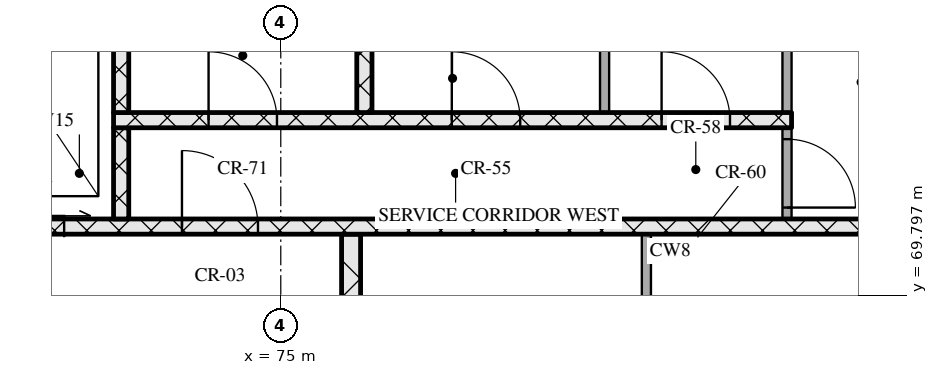
"""IFC4 building model, lengths in metres.
Left out: names, types, materials, properties, quantities, classifications, styles, units other than length and angle.
Written with IfcOpenShell. Run it as: python <this file> out.ifc"""

import sys

from ifc_helpers import new_model, si_unit, direction, frame, frame_2d, origin, place, context, subcontext, project, spatial, rectangle, extrude, element, fill, save


model = new_model("IFC4")
c1 = context("Model", 3, precision=1e-05, world=origin(), true_north=direction((0.0, 1.0)))
c2 = subcontext(c1, "Body", "Model", "MODEL_VIEW")
j1 = project(units=[si_unit("LENGTHUNIT", "METRE"), si_unit("PLANEANGLEUNIT", "RADIAN")], contexts=[c1])
p1 = place(None, origin())
s1 = spatial("IfcSite", under=j1, at=p1, CompositionType="ELEMENT")
p2 = place(p1, origin())
s2 = spatial("IfcBuilding", under=s1, at=p2, CompositionType="ELEMENT")
p3 = place(p2, frame((0.0, 0.0, 212.7)))
s3 = spatial("IfcBuildingStorey", under=s2, at=p3, CompositionType="ELEMENT", Elevation=212.7)
p4 = place(p3, frame((79.81, 68.0, 0.0), z_axis=(0.0, 0.0, 1.0), x_axis=(0.0, 1.0, 0.0)))
e1 = element("IfcWall", 1, at=p4, inside=s3, PredefinedType="PARTITIONING", context=c2, shape_type="SweptSolid", body=[
    extrude(rectangle(XDim=2.6, YDim=0.12, at=frame_2d((1.3, 0.0))), origin(), (0.0, 0.0, 1.0), 3.32),
])
p5 = place(p3, frame((75.925, 68.3, 0.0), z_axis=(0.0, 0.0, 1.0), x_axis=(0.0, 1.0, 0.0)))
e2 = element("IfcWall", 2, at=p5, inside=s3, PredefinedType="SOLIDWALL", context=c2, shape_type="SweptSolid", body=[
    extrude(rectangle(XDim=2.3, YDim=0.25, at=frame_2d((1.15, 0.0))), origin(), (0.0, 0.0, 1.0), 3.32),
])
p6 = place(p3, frame((67.8, 70.7, 0.0), z_axis=(0.0, 0.0, 1.0), x_axis=(1.0, 0.0, 0.0)))
e3 = element("IfcWall", 3, at=p6, inside=s3, PredefinedType="SOLIDWALL", context=c2, shape_type="SweptSolid", body=[
    extrude(rectangle(XDim=39.6, YDim=0.2, at=frame_2d((19.8, 0.0))), origin(), (0.0, 0.0, 1.0), 3.32),
])
p7 = place(p6, frame((0.65, 0.0, 0.0)))
e4 = element("IfcOpeningElement", 4, at=p7, cuts=e3, PredefinedType="OPENING", context=c2, shape_type="SweptSolid", body=[
    extrude(rectangle(XDim=1.1, YDim=2.1, at=frame_2d((0.55, 1.05))), frame((0.0, 0.11, 0.0), z_axis=(0.0, -1.0, 0.0), x_axis=(1.0, 0.0, 0.0)), (0.0, 0.0, 1.0), 0.22),
])
p8 = place(p6, frame((3.25, 0.0, 0.0)))
e5 = element("IfcOpeningElement", 5, at=p8, cuts=e3, PredefinedType="OPENING", context=c2, shape_type="SweptSolid", body=[
    extrude(rectangle(XDim=1.1, YDim=2.1, at=frame_2d((0.55, 1.05))), frame((0.0, 0.11, 0.0), z_axis=(0.0, -1.0, 0.0), x_axis=(1.0, 0.0, 0.0)), (0.0, 0.0, 1.0), 0.22),
])
p9 = place(p6, frame((5.9, 0.0, 0.0)))
e6 = element("IfcOpeningElement", 6, at=p9, cuts=e3, PredefinedType="OPENING", context=c2, shape_type="SweptSolid", body=[
    extrude(rectangle(XDim=1.0, YDim=2.1, at=frame_2d((0.5, 1.05))), frame((0.0, 0.11, 0.0), z_axis=(0.0, -1.0, 0.0), x_axis=(1.0, 0.0, 0.0)), (0.0, 0.0, 1.0), 0.22),
])
p10 = place(p6, frame((21.7, 0.0, 0.0)))
e7 = element("IfcOpeningElement", 7, at=p10, cuts=e3, PredefinedType="OPENING", context=c2, shape_type="SweptSolid", body=[
    extrude(rectangle(XDim=1.0, YDim=2.1, at=frame_2d((0.5, 1.05))), frame((0.0, 0.11, 0.0), z_axis=(0.0, -1.0, 0.0), x_axis=(1.0, 0.0, 0.0)), (0.0, 0.0, 1.0), 0.22),
])
p11 = place(p6, frame((32.7, 0.0, 0.0)))
e8 = element("IfcOpeningElement", 8, at=p11, cuts=e3, PredefinedType="OPENING", context=c2, shape_type="SweptSolid", body=[
    extrude(rectangle(XDim=1.0, YDim=2.1, at=frame_2d((0.5, 1.05))), frame((0.0, 0.11, 0.0), z_axis=(0.0, -1.0, 0.0), x_axis=(1.0, 0.0, 0.0)), (0.0, 0.0, 1.0), 0.22),
])
p12 = place(p6, frame((35.25, 0.0, 0.0)))
e9 = element("IfcOpeningElement", 9, at=p12, cuts=e3, PredefinedType="OPENING", context=c2, shape_type="SweptSolid", body=[
    extrude(rectangle(XDim=1.1, YDim=2.1, at=frame_2d((0.55, 1.05))), frame((0.0, 0.11, 0.0), z_axis=(0.0, -1.0, 0.0), x_axis=(1.0, 0.0, 0.0)), (0.0, 0.0, 1.0), 0.22),
])
p13 = place(p6, frame((37.85, 0.0, 0.0)))
e10 = element("IfcOpeningElement", 10, at=p13, cuts=e3, PredefinedType="OPENING", context=c2, shape_type="SweptSolid", body=[
    extrude(rectangle(XDim=1.1, YDim=2.1, at=frame_2d((0.55, 1.05))), frame((0.0, 0.11, 0.0), z_axis=(0.0, -1.0, 0.0), x_axis=(1.0, 0.0, 0.0)), (0.0, 0.0, 1.0), 0.22),
])
p14 = place(p3, frame((72.9, 70.8, 0.0), z_axis=(0.0, 0.0, 1.0), x_axis=(0.0, 1.0, 0.0)))
e11 = element("IfcWall", 11, at=p14, inside=s3, PredefinedType="SOLIDWALL", context=c2, shape_type="SweptSolid", body=[
    extrude(rectangle(XDim=1.2, YDim=0.2, at=frame_2d((0.6, 0.0))), origin(), (0.0, 0.0, 1.0), 3.32),
])
p15 = place(p3, frame((81.66, 70.8, 0.0), z_axis=(0.0, 0.0, 1.0), x_axis=(0.0, 1.0, 0.0)))
e12 = element("IfcWall", 12, at=p15, inside=s3, PredefinedType="PARTITIONING", context=c2, shape_type="SweptSolid", body=[
    extrude(rectangle(XDim=1.2, YDim=0.12, at=frame_2d((0.6, 0.0))), origin(), (0.0, 0.0, 1.0), 3.32),
])
p16 = place(p15, frame((0.15, 0.0, 0.0)))
e13 = element("IfcOpeningElement", 13, at=p16, cuts=e12, PredefinedType="OPENING", context=c2, shape_type="SweptSolid", body=[
    extrude(rectangle(XDim=0.9, YDim=2.1, at=frame_2d((0.45, 1.05))), frame((0.0, 0.07, 0.0), z_axis=(0.0, -1.0, 0.0), x_axis=(1.0, 0.0, 0.0)), (0.0, 0.0, 1.0), 0.14),
])
p17 = place(p3, frame((72.8, 72.1, 0.0), z_axis=(0.0, 0.0, 1.0), x_axis=(1.0, 0.0, 0.0)))
e14 = element("IfcWall", 14, at=p17, inside=s3, PredefinedType="SOLIDWALL", context=c2, shape_type="SweptSolid", body=[
    extrude(rectangle(XDim=8.92, YDim=0.2, at=frame_2d((4.46, 0.0))), origin(), (0.0, 0.0, 1.0), 3.32),
])
p18 = place(p17, frame((1.25, 0.0, 0.0)))
e15 = element("IfcOpeningElement", 15, at=p18, cuts=e14, PredefinedType="OPENING", context=c2, shape_type="SweptSolid", body=[
    extrude(rectangle(XDim=0.9, YDim=2.1, at=frame_2d((0.45, 1.05))), frame((0.0, 0.11, 0.0), z_axis=(0.0, -1.0, 0.0), x_axis=(1.0, 0.0, 0.0)), (0.0, 0.0, 1.0), 0.22),
])
p19 = place(p17, frame((4.45, 0.0, 0.0)))
e16 = element("IfcOpeningElement", 16, at=p19, cuts=e14, PredefinedType="OPENING", context=c2, shape_type="SweptSolid", body=[
    extrude(rectangle(XDim=0.9, YDim=2.1, at=frame_2d((0.45, 1.05))), frame((0.0, 0.11, 0.0), z_axis=(0.0, -1.0, 0.0), x_axis=(1.0, 0.0, 0.0)), (0.0, 0.0, 1.0), 0.22),
])
p20 = place(p17, frame((7.21, 0.0, 0.0)))
e17 = element("IfcOpeningElement", 17, at=p20, cuts=e14, PredefinedType="OPENING", context=c2, shape_type="SweptSolid", body=[
    extrude(rectangle(XDim=0.9, YDim=2.1, at=frame_2d((0.45, 1.05))), frame((0.0, 0.11, 0.0), z_axis=(0.0, -1.0, 0.0), x_axis=(1.0, 0.0, 0.0)), (0.0, 0.0, 1.0), 0.22),
])
for number, where, z_axis, x_axis in (
    (18, (72.9, 72.2, 0.0), (0.0, 0.0, 1.0), (0.0, 1.0, 0.0)),
    (19, (76.1, 72.2, 0.0), (0.0, 0.0, 1.0), (0.0, 1.0, 0.0)),
):
    element("IfcWall", number, at=place(p3, frame(where, z_axis=z_axis, x_axis=x_axis)), inside=s3, PredefinedType="SOLIDWALL", context=c2, shape_type="SweptSolid", body=[
        extrude(rectangle(XDim=2.2, YDim=0.2, at=frame_2d((1.1, 0.0))), origin(), (0.0, 0.0, 1.0), 3.32),
    ])
for number, where, z_axis, x_axis in (
    (20, (79.26, 72.2, 0.0), (0.0, 0.0, 1.0), (0.0, 1.0, 0.0)),
    (21, (81.66, 72.2, 0.0), (0.0, 0.0, 1.0), (0.0, 1.0, 0.0)),
):
    element("IfcWall", number, at=place(p3, frame(where, z_axis=z_axis, x_axis=x_axis)), inside=s3, PredefinedType="PARTITIONING", context=c2, shape_type="SweptSolid", body=[
        extrude(rectangle(XDim=2.2, YDim=0.12, at=frame_2d((1.1, 0.0))), origin(), (0.0, 0.0, 1.0), 3.32),
    ])
p21 = place(p8, origin())
e22 = element("IfcDoor", 22, at=p21, inside=s3, OperationType="SLIDING_TO_RIGHT", PredefinedType="DOOR", context=c2, shape_type="SweptSolid", body=[
    extrude(rectangle(XDim=1.1, YDim=2.1, at=frame_2d((0.55, 1.05))), frame((0.0, 0.025, 0.0), z_axis=(0.0, -1.0, 0.0), x_axis=(1.0, 0.0, 0.0)), (0.0, 0.0, 1.0), 0.05),
])
fill(e5, e22)
p22 = place(p9, origin())
e23 = element("IfcDoor", 23, at=p22, inside=s3, OperationType="SINGLE_SWING_LEFT", PredefinedType="DOOR", context=c2, shape_type="SweptSolid", body=[
    extrude(rectangle(XDim=1.0, YDim=2.1, at=frame_2d((0.5, 1.05))), frame((0.0, 0.025, 0.0), z_axis=(0.0, -1.0, 0.0), x_axis=(1.0, 0.0, 0.0)), (0.0, 0.0, 1.0), 0.05),
])
fill(e6, e23)
p23 = place(p16, origin())
e24 = element("IfcDoor", 24, at=p23, inside=s3, OperationType="SINGLE_SWING_RIGHT", PredefinedType="DOOR", context=c2, shape_type="SweptSolid", body=[
    extrude(rectangle(XDim=0.9, YDim=2.1, at=frame_2d((0.45, 1.05))), frame((0.0, 0.025, 0.0), z_axis=(0.0, -1.0, 0.0), x_axis=(1.0, 0.0, 0.0)), (0.0, 0.0, 1.0), 0.05),
])
fill(e13, e24)
p24 = place(p18, origin())
e25 = element("IfcDoor", 25, at=p24, inside=s3, OperationType="SINGLE_SWING_LEFT", PredefinedType="DOOR", context=c2, shape_type="SweptSolid", body=[
    extrude(rectangle(XDim=0.9, YDim=2.1, at=frame_2d((0.45, 1.05))), frame((0.0, 0.025, 0.0), z_axis=(0.0, -1.0, 0.0), x_axis=(1.0, 0.0, 0.0)), (0.0, 0.0, 1.0), 0.05),
])
fill(e15, e25)
p25 = place(p19, origin())
e26 = element("IfcDoor", 26, at=p25, inside=s3, OperationType="SINGLE_SWING_LEFT", PredefinedType="DOOR", context=c2, shape_type="SweptSolid", body=[
    extrude(rectangle(XDim=0.9, YDim=2.1, at=frame_2d((0.45, 1.05))), frame((0.0, 0.025, 0.0), z_axis=(0.0, -1.0, 0.0), x_axis=(1.0, 0.0, 0.0)), (0.0, 0.0, 1.0), 0.05),
])
fill(e16, e26)
p26 = place(p20, origin())
e27 = element("IfcDoor", 27, at=p26, inside=s3, OperationType="SINGLE_SWING_LEFT", PredefinedType="DOOR", context=c2, shape_type="SweptSolid", body=[
    extrude(rectangle(XDim=0.9, YDim=2.1, at=frame_2d((0.45, 1.05))), frame((0.0, 0.025, 0.0), z_axis=(0.0, -1.0, 0.0), x_axis=(1.0, 0.0, 0.0)), (0.0, 0.0, 1.0), 0.05),
])
fill(e17, e27)
save(model, sys.argv[1])
